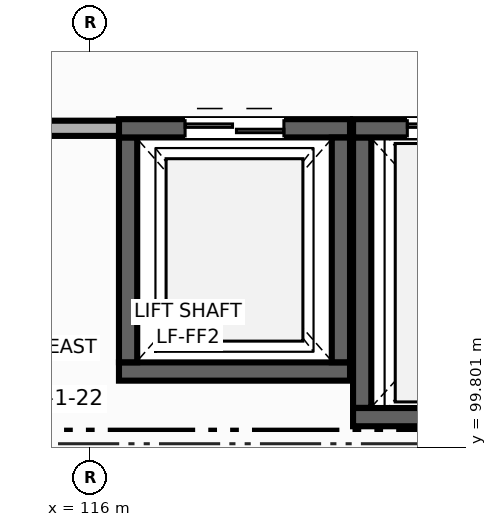
"""IFC4 building model, lengths in metres.
Left out: names, types, materials, properties, quantities, classifications, styles, units other than length and angle.
Written with IfcOpenShell. Run it as: python <this file> out.ifc"""

import sys

from ifc_helpers import new_model, si_unit, direction, frame, frame_2d, origin, place, context, subcontext, project, spatial, rectangle, extrude, element, fill, save


model = new_model("IFC4")
c1 = context("Model", 3, precision=1e-05, world=origin(), true_north=direction((0.0, 1.0)))
c2 = subcontext(c1, "Body", "Model", "MODEL_VIEW")
j1 = project(units=[si_unit("LENGTHUNIT", "METRE"), si_unit("PLANEANGLEUNIT", "RADIAN")], contexts=[c1])
p1 = place(None, origin())
s1 = spatial("IfcSite", under=j1, at=p1, CompositionType="ELEMENT")
p2 = place(p1, origin())
s2 = spatial("IfcBuilding", under=s1, at=p2, CompositionType="ELEMENT")
p3 = place(p2, frame((0.0, 0.0, 9.9)))
s3 = spatial("IfcBuildingStorey", under=s2, at=p3, CompositionType="ELEMENT", Elevation=9.9)
p4 = place(p3, frame((119.42, 100.8, 0.0), z_axis=(0.0, 0.0, 1.0), x_axis=(-1.0, 0.0, 0.0)))
e1 = element("IfcWall", 1, at=p4, inside=s3, PredefinedType="SHEAR", context=c2, shape_type="SweptSolid", body=[
    extrude(rectangle(XDim=3.04, YDim=0.24, at=frame_2d((1.52, 0.0))), origin(), (0.0, 0.0, 1.0), 4.26),
])
p5 = place(p3, frame((116.5, 100.922, 0.0), z_axis=(0.0, 0.0, 1.0), x_axis=(0.0, 1.0, 0.0)))
e2 = element("IfcWall", 2, at=p5, inside=s3, PredefinedType="SHEAR", context=c2, shape_type="SweptSolid", body=[
    extrude(rectangle(XDim=2.958, YDim=0.24, at=frame_2d((1.479, 0.0))), origin(), (0.0, 0.0, 1.0), 4.26),
])
p6 = place(p3, frame((116.38, 104.0, 0.0), z_axis=(0.0, 0.0, 1.0), x_axis=(1.0, 0.0, 0.0)))
e3 = element("IfcWall", 3, at=p6, inside=s3, PredefinedType="SHEAR", context=c2, shape_type="SweptSolid", body=[
    extrude(rectangle(XDim=3.04, YDim=0.24, at=frame_2d((1.52, 0.0))), origin(), (0.0, 0.0, 1.0), 4.26),
])
p7 = place(p6, frame((0.87, 0.0, 0.0)))
e4 = element("IfcOpeningElement", 4, at=p7, cuts=e3, PredefinedType="OPENING", context=c2, shape_type="SweptSolid", body=[
    extrude(rectangle(XDim=1.3, YDim=2.15, at=frame_2d((0.65, 1.075))), frame((0.0, 0.13, 0.0), z_axis=(0.0, -1.0, 0.0), x_axis=(1.0, 0.0, 0.0)), (0.0, 0.0, 1.0), 0.26),
])
p8 = place(p3, frame((119.3, 103.878, 0.0), z_axis=(0.0, 0.0, 1.0), x_axis=(0.0, -1.0, 0.0)))
e5 = element("IfcWall", 5, at=p8, inside=s3, PredefinedType="SHEAR", context=c2, shape_type="SweptSolid", body=[
    extrude(rectangle(XDim=2.956, YDim=0.24, at=frame_2d((1.478, 0.0))), origin(), (0.0, 0.0, 1.0), 4.26),
])
p9 = place(p3, frame((123.088, 100.2, 0.0), z_axis=(0.0, 0.0, 1.0), x_axis=(-1.0, 0.0, 0.0)))
e6 = element("IfcWall", 6, at=p9, inside=s3, PredefinedType="SHEAR", context=c2, shape_type="SweptSolid", body=[
    extrude(rectangle(XDim=3.628, YDim=0.24, at=frame_2d((1.814, 0.0))), origin(), (0.0, 0.0, 1.0), 4.26),
])
p10 = place(p3, frame((119.58, 100.322, 0.0), z_axis=(0.0, 0.0, 1.0), x_axis=(0.0, 1.0, 0.0)))
e7 = element("IfcWall", 7, at=p10, inside=s3, PredefinedType="SHEAR", context=c2, shape_type="SweptSolid", body=[
    extrude(rectangle(XDim=3.558, YDim=0.24, at=frame_2d((1.779, 0.0))), origin(), (0.0, 0.0, 1.0), 4.26),
])
p11 = place(p3, frame((119.46, 104.0, 0.0), z_axis=(0.0, 0.0, 1.0), x_axis=(1.0, 0.0, 0.0)))
e8 = element("IfcWall", 8, at=p11, inside=s3, PredefinedType="SHEAR", context=c2, shape_type="SweptSolid", body=[
    extrude(rectangle(XDim=3.628, YDim=0.24, at=frame_2d((1.814, 0.0))), origin(), (0.0, 0.0, 1.0), 4.26),
])
p12 = place(p11, frame((0.714, 0.0, 0.0)))
e9 = element("IfcOpeningElement", 9, at=p12, cuts=e8, PredefinedType="OPENING", context=c2, shape_type="SweptSolid", body=[
    extrude(rectangle(XDim=2.2, YDim=2.5, at=frame_2d((1.1, 1.25))), frame((0.0, 0.13, 0.0), z_axis=(0.0, -1.0, 0.0), x_axis=(1.0, 0.0, 0.0)), (0.0, 0.0, 1.0), 0.26),
])
p13 = place(p3, frame((116.38, 104.0, 0.0), z_axis=(0.0, 0.0, 1.0), x_axis=(-1.0, 0.0, 0.0)))
e10 = element("IfcWall", 10, at=p13, inside=s3, PredefinedType="PARTITIONING", context=c2, shape_type="SweptSolid", body=[
    extrude(rectangle(XDim=1.88, YDim=0.2, at=frame_2d((0.94, 0.0))), origin(), (0.0, 0.0, 1.0), 4.26),
])
p14 = place(p7, origin())
e11 = element("IfcDoor", 11, at=p14, inside=s3, OperationType="DOUBLE_DOOR_SLIDING", PredefinedType="DOOR", context=c2, shape_type="SweptSolid", body=[
    extrude(rectangle(XDim=1.3, YDim=2.15, at=frame_2d((0.65, 1.075))), frame((0.0, 0.025, 0.0), z_axis=(0.0, -1.0, 0.0), x_axis=(1.0, 0.0, 0.0)), (0.0, 0.0, 1.0), 0.05),
])
fill(e4, e11)
p15 = place(p12, origin())
e12 = element("IfcDoor", 12, at=p15, inside=s3, OperationType="DOUBLE_DOOR_SLIDING", PredefinedType="DOOR", context=c2, shape_type="SweptSolid", body=[
    extrude(rectangle(XDim=2.2, YDim=2.5, at=frame_2d((1.1, 1.25))), frame((0.0, 0.025, 0.0), z_axis=(0.0, -1.0, 0.0), x_axis=(1.0, 0.0, 0.0)), (0.0, 0.0, 1.0), 0.05),
])
fill(e9, e12)
save(model, sys.argv[1])
